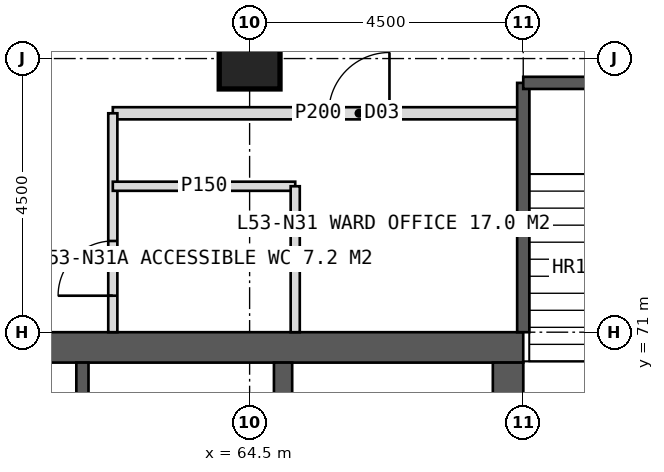
"""IFC4 building model, lengths in metres.
Left out: names, types, materials, properties, quantities, classifications, styles, units other than length and angle.
Written with IfcOpenShell. Run it as: python <this file> out.ifc"""

import sys

from ifc_helpers import new_model, si_unit, direction, frame, frame_2d, origin, origin_2d, place, context, subcontext, project, spatial, rectangle, hollow_rectangle, extrude, element, fill, save


model = new_model("IFC4")
c1 = context("Model", 3, precision=1e-05, world=origin(), true_north=direction((0.0, 1.0)))
c2 = subcontext(c1, "Body", "Model", "MODEL_VIEW")
j1 = project(units=[si_unit("LENGTHUNIT", "METRE"), si_unit("PLANEANGLEUNIT", "RADIAN")], contexts=[c1])
p1 = place(None, origin())
s1 = spatial("IfcSite", under=j1, at=p1, CompositionType="ELEMENT")
p2 = place(p1, origin())
s2 = spatial("IfcBuilding", under=s1, at=p2, CompositionType="ELEMENT")
p3 = place(p2, frame((0.0, 0.0, 221.0)))
s3 = spatial("IfcBuildingStorey", under=s2, at=p3, CompositionType="ELEMENT", Elevation=221.0)
p4 = place(p3, frame((51.0, 70.75, 0.0), z_axis=(0.0, 0.0, 1.0), x_axis=(1.0, 0.0, 0.0)))
e1 = element("IfcWall", 1, at=p4, inside=s3, PredefinedType="SHEAR", context=c2, shape_type="SweptSolid", body=[
    extrude(rectangle(XDim=18.0, YDim=0.5, at=frame_2d((9.0, 0.0))), origin(), (0.0, 0.0, 1.0), 4.0),
])
p5 = place(p4, frame((8.1, 0.0, 0.0)))
e2 = element("IfcOpeningElement", 2, at=p5, cuts=e1, PredefinedType="OPENING", context=c2, shape_type="SweptSolid", body=[
    extrude(rectangle(XDim=1.8, YDim=2.2, at=frame_2d((0.9, 1.1))), frame((0.0, 0.26, 0.0), z_axis=(0.0, -1.0, 0.0), x_axis=(1.0, 0.0, 0.0)), (0.0, 0.0, 1.0), 0.52),
])
p6 = place(p3, frame((68.75, 53.5, 0.0), z_axis=(0.0, 0.0, 1.0), x_axis=(0.0, 1.0, 0.0)))
e3 = element("IfcWall", 3, at=p6, inside=s3, PredefinedType="SHEAR", context=c2, shape_type="SweptSolid", body=[
    extrude(rectangle(XDim=17.0, YDim=0.5, at=frame_2d((8.5, 0.0))), origin(), (0.0, 0.0, 1.0), 4.0),
])
p7 = place(p6, frame((9.6, 0.0, 0.0)))
e4 = element("IfcOpeningElement", 4, at=p7, cuts=e3, PredefinedType="OPENING", context=c2, shape_type="SweptSolid", body=[
    extrude(rectangle(XDim=1.5, YDim=2.2, at=frame_2d((0.75, 1.1))), frame((0.0, 0.26, 0.0), z_axis=(0.0, -1.0, 0.0), x_axis=(1.0, 0.0, 0.0)), (0.0, 0.0, 1.0), 0.52),
])
p8 = place(p3, frame((65.05, 53.5, 0.0), z_axis=(0.0, 0.0, 1.0), x_axis=(0.0, 1.0, 0.0)))
e5 = element("IfcWall", 5, at=p8, inside=s3, PredefinedType="SHEAR", context=c2, shape_type="SweptSolid", body=[
    extrude(rectangle(XDim=17.0, YDim=0.3, at=frame_2d((8.5, 0.0))), origin(), (0.0, 0.0, 1.0), 4.0),
])
p9 = place(p3, frame((61.75, 53.5, 0.0), z_axis=(0.0, 0.0, 1.0), x_axis=(0.0, 1.0, 0.0)))
e6 = element("IfcWall", 6, at=p9, inside=s3, PredefinedType="SHEAR", context=c2, shape_type="SweptSolid", body=[
    extrude(rectangle(XDim=17.0, YDim=0.2, at=frame_2d((8.5, 0.0))), origin(), (0.0, 0.0, 1.0), 4.0),
])
p10 = place(p9, frame((0.496, 0.0, 0.0)))
e7 = element("IfcOpeningElement", 7, at=p10, cuts=e6, PredefinedType="OPENING", context=c2, shape_type="SweptSolid", body=[
    extrude(rectangle(XDim=1.0, YDim=2.1, at=frame_2d((0.5, 1.05))), frame((0.0, 0.11, 0.0), z_axis=(0.0, -1.0, 0.0), x_axis=(1.0, 0.0, 0.0)), (0.0, 0.0, 1.0), 0.22),
])
p11 = place(p9, frame((2.646, 0.0, 0.0)))
e8 = element("IfcOpeningElement", 8, at=p11, cuts=e6, PredefinedType="OPENING", context=c2, shape_type="SweptSolid", body=[
    extrude(rectangle(XDim=1.0, YDim=2.1, at=frame_2d((0.5, 1.05))), frame((0.0, 0.11, 0.0), z_axis=(0.0, -1.0, 0.0), x_axis=(1.0, 0.0, 0.0)), (0.0, 0.0, 1.0), 0.22),
])
p12 = place(p9, frame((5.027, 0.0, 0.0)))
e9 = element("IfcOpeningElement", 9, at=p12, cuts=e6, PredefinedType="OPENING", context=c2, shape_type="SweptSolid", body=[
    extrude(rectangle(XDim=1.0, YDim=2.1, at=frame_2d((0.5, 1.05))), frame((0.0, 0.11, 0.0), z_axis=(0.0, -1.0, 0.0), x_axis=(1.0, 0.0, 0.0)), (0.0, 0.0, 1.0), 0.22),
])
p13 = place(p9, frame((7.126, 0.0, 0.0)))
e10 = element("IfcOpeningElement", 10, at=p13, cuts=e6, PredefinedType="OPENING", context=c2, shape_type="SweptSolid", body=[
    extrude(rectangle(XDim=1.0, YDim=2.1, at=frame_2d((0.5, 1.05))), frame((0.0, 0.11, 0.0), z_axis=(0.0, -1.0, 0.0), x_axis=(1.0, 0.0, 0.0)), (0.0, 0.0, 1.0), 0.22),
])
p14 = place(p9, frame((10.025, 0.0, 0.0)))
e11 = element("IfcOpeningElement", 11, at=p14, cuts=e6, PredefinedType="OPENING", context=c2, shape_type="SweptSolid", body=[
    extrude(rectangle(XDim=1.4, YDim=2.2, at=frame_2d((0.7, 1.1))), frame((0.0, 0.11, 0.0), z_axis=(0.0, -1.0, 0.0), x_axis=(1.0, 0.0, 0.0)), (0.0, 0.0, 1.0), 0.22),
])
p15 = place(p9, frame((14.325, 0.0, 0.0)))
e12 = element("IfcOpeningElement", 12, at=p15, cuts=e6, PredefinedType="OPENING", context=c2, shape_type="SweptSolid", body=[
    extrude(rectangle(XDim=1.4, YDim=2.2, at=frame_2d((0.7, 1.1))), frame((0.0, 0.11, 0.0), z_axis=(0.0, -1.0, 0.0), x_axis=(1.0, 0.0, 0.0)), (0.0, 0.0, 1.0), 0.22),
])
p16 = place(p3, frame((64.5, 75.5, 0.0), z_axis=(0.0, 0.0, 1.0), x_axis=(1.0, 0.0, 0.0)))
e13 = element("IfcColumn", 13, at=p16, inside=s3, PredefinedType="COLUMN", context=c2, shape_type="SweptSolid", body=[
    extrude(hollow_rectangle(XDim=1.0, YDim=1.0, WallThickness=0.1, at=origin_2d()), origin(), (0.0, 0.0, 1.0), 4.0),
])
p17 = place(p3, frame((62.25, 74.6, 0.0), z_axis=(0.0, 0.0, 1.0), x_axis=(1.0, 0.0, 0.0)))
e14 = element("IfcWall", 14, at=p17, inside=s3, PredefinedType="PARTITIONING", context=c2, shape_type="SweptSolid", body=[
    extrude(rectangle(XDim=6.75, YDim=0.2, at=frame_2d((3.375, 0.0))), origin(), (0.0, 0.0, 1.0), 3.75),
])
p18 = place(p17, frame((3.55, 0.0, 0.0)))
e15 = element("IfcOpeningElement", 15, at=p18, cuts=e14, PredefinedType="OPENING", context=c2, shape_type="SweptSolid", body=[
    extrude(rectangle(XDim=1.0, YDim=2.1, at=frame_2d((0.5, 1.05))), frame((0.0, 0.11, 0.0), z_axis=(0.0, -1.0, 0.0), x_axis=(1.0, 0.0, 0.0)), (0.0, 0.0, 1.0), 0.22),
])
p19 = place(p3, frame((62.25, 71.0, 0.0), z_axis=(0.0, 0.0, 1.0), x_axis=(0.0, 1.0, 0.0)))
e16 = element("IfcWall", 16, at=p19, inside=s3, PredefinedType="PARTITIONING", context=c2, shape_type="SweptSolid", body=[
    extrude(rectangle(XDim=3.6, YDim=0.15, at=frame_2d((1.8, 0.0))), origin(), (0.0, 0.0, 1.0), 3.75),
])
p20 = place(p19, frame((0.6, 0.0, 0.0)))
e17 = element("IfcOpeningElement", 17, at=p20, cuts=e16, PredefinedType="OPENING", context=c2, shape_type="SweptSolid", body=[
    extrude(rectangle(XDim=0.9, YDim=2.1, at=frame_2d((0.45, 1.05))), frame((0.0, 0.085, 0.0), z_axis=(0.0, -1.0, 0.0), x_axis=(1.0, 0.0, 0.0)), (0.0, 0.0, 1.0), 0.17),
])
p21 = place(p3, frame((62.25, 73.4, 0.0), z_axis=(0.0, 0.0, 1.0), x_axis=(1.0, 0.0, 0.0)))
e18 = element("IfcWall", 18, at=p21, inside=s3, PredefinedType="PARTITIONING", context=c2, shape_type="SweptSolid", body=[
    extrude(rectangle(XDim=3.0, YDim=0.15, at=frame_2d((1.5, 0.0))), origin(), (0.0, 0.0, 1.0), 3.75),
])
p22 = place(p3, frame((65.25, 71.0, 0.0), z_axis=(0.0, 0.0, 1.0), x_axis=(0.0, 1.0, 0.0)))
e19 = element("IfcWall", 19, at=p22, inside=s3, PredefinedType="PARTITIONING", context=c2, shape_type="SweptSolid", body=[
    extrude(rectangle(XDim=2.4, YDim=0.15, at=frame_2d((1.2, 0.0))), origin(), (0.0, 0.0, 1.0), 3.75),
])
p23 = place(p3, frame((69.0, 71.0, 0.0), z_axis=(0.0, 0.0, 1.0), x_axis=(0.0, 1.0, 0.0)))
e20 = element("IfcWall", 20, at=p23, inside=s3, PredefinedType="SOLIDWALL", context=c2, shape_type="SweptSolid", body=[
    extrude(rectangle(XDim=4.1, YDim=0.2, at=frame_2d((2.05, 0.0))), origin(), (0.0, 0.0, 1.0), 3.75),
])
p24 = place(p3, frame((69.0, 75.1, 0.0), z_axis=(0.0, 0.0, 1.0), x_axis=(1.0, 0.0, 0.0)))
e21 = element("IfcWall", 21, at=p24, inside=s3, PredefinedType="SOLIDWALL", context=c2, shape_type="SweptSolid", body=[
    extrude(rectangle(XDim=3.5, YDim=0.2, at=frame_2d((1.75, 0.0))), origin(), (0.0, 0.0, 1.0), 3.75),
])
p25 = place(p24, frame((1.15, 0.0, 0.0)))
e22 = element("IfcOpeningElement", 22, at=p25, cuts=e21, PredefinedType="OPENING", context=c2, shape_type="SweptSolid", body=[
    extrude(rectangle(XDim=1.2, YDim=2.1, at=frame_2d((0.6, 1.05))), frame((0.0, 0.11, 0.0), z_axis=(0.0, -1.0, 0.0), x_axis=(1.0, 0.0, 0.0)), (0.0, 0.0, 1.0), 0.22),
])
p26 = place(p20, origin())
e23 = element("IfcDoor", 23, at=p26, inside=s3, OperationType="SINGLE_SWING_LEFT", PredefinedType="DOOR", context=c2, shape_type="SweptSolid", body=[
    extrude(rectangle(XDim=0.9, YDim=2.1, at=frame_2d((0.45, 1.05))), frame((0.0, 0.025, 0.0), z_axis=(0.0, -1.0, 0.0), x_axis=(1.0, 0.0, 0.0)), (0.0, 0.0, 1.0), 0.05),
])
fill(e17, e23)
p27 = place(p18, origin())
e24 = element("IfcDoor", 24, at=p27, inside=s3, OperationType="SINGLE_SWING_RIGHT", PredefinedType="DOOR", context=c2, shape_type="SweptSolid", body=[
    extrude(rectangle(XDim=1.0, YDim=2.1, at=frame_2d((0.5, 1.05))), frame((0.0, 0.025, 0.0), z_axis=(0.0, -1.0, 0.0), x_axis=(1.0, 0.0, 0.0)), (0.0, 0.0, 1.0), 0.05),
])
fill(e15, e24)
save(model, sys.argv[1])
